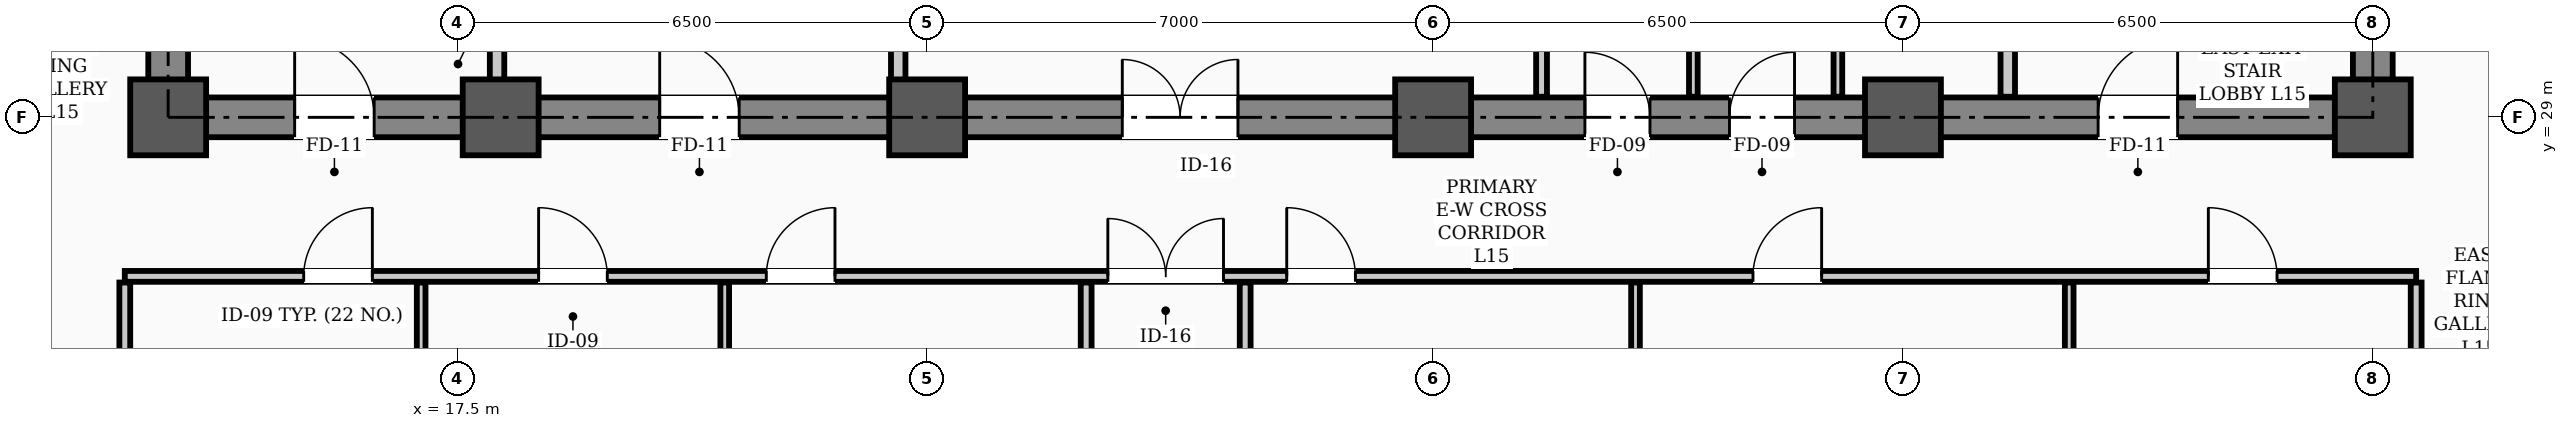
"""IFC4 building model, lengths in metres.
Left out: names, types, materials, properties, quantities, classifications, styles, units other than length and angle.
Written with IfcOpenShell. Run it as: python <this file> out.ifc"""

import sys

from ifc_helpers import new_model, si_unit, direction, frame, frame_2d, origin, origin_2d, place, context, subcontext, project, spatial, rectangle, hollow_rectangle, extrude, element, fill, save


model = new_model("IFC4")
c1 = context("Model", 3, precision=1e-05, world=origin(), true_north=direction((0.0, 1.0)))
c2 = subcontext(c1, "Body", "Model", "MODEL_VIEW")
j1 = project(units=[si_unit("LENGTHUNIT", "METRE"), si_unit("PLANEANGLEUNIT", "RADIAN")], contexts=[c1])
p1 = place(None, origin())
s1 = spatial("IfcSite", under=j1, at=p1, CompositionType="ELEMENT")
p2 = place(p1, origin())
s2 = spatial("IfcBuilding", under=s1, at=p2, CompositionType="ELEMENT")
p3 = place(p2, frame((0.0, 0.0, 61.6)))
s3 = spatial("IfcBuildingStorey", under=s2, at=p3, CompositionType="ELEMENT", Elevation=61.6)
for number, where, z_axis, x_axis in (
    (1, (13.5, 29.0, 0.0), (0.0, 0.0, 1.0), (1.0, 0.0, 0.0)),
    (2, (18.1, 29.0, 0.0), (0.0, 0.0, 1.0), (1.0, 0.0, 0.0)),
    (3, (24.0, 29.0, 0.0), (0.0, 0.0, 1.0), (1.0, 0.0, 0.0)),
    (4, (31.0, 29.0, 0.0), (0.0, 0.0, 1.0), (1.0, 0.0, 0.0)),
    (5, (37.5, 29.0, 0.0), (0.0, 0.0, 1.0), (1.0, 0.0, 0.0)),
    (6, (44.0, 29.0, 0.0), (0.0, 0.0, 1.0), (1.0, 0.0, 0.0)),
):
    element("IfcColumn", number, at=place(p3, frame(where, z_axis=z_axis, x_axis=x_axis)), inside=s3, PredefinedType="COLUMN", context=c2, shape_type="SweptSolid", body=[
        extrude(hollow_rectangle(XDim=1.05, YDim=1.05, WallThickness=0.038, InnerFilletRadius=0.019, OuterFilletRadius=0.057, at=origin_2d()), origin(), (0.0, 0.0, 1.0), 3.9),
    ])
p4 = place(p3, frame((13.5, 29.0, 0.0), z_axis=(0.0, 0.0, 1.0), x_axis=(1.0, 0.0, 0.0)))
e7 = element("IfcWall", 7, at=p4, inside=s3, PredefinedType="SHEAR", context=c2, shape_type="SweptSolid", body=[
    extrude(rectangle(XDim=30.5, YDim=0.55, at=frame_2d((15.25, 0.0))), origin(), (0.0, 0.0, 1.0), 3.72),
])
p5 = place(p4, frame((1.75, 0.0, 0.0)))
e8 = element("IfcOpeningElement", 8, at=p5, cuts=e7, PredefinedType="OPENING", context=c2, shape_type="SweptSolid", body=[
    extrude(rectangle(XDim=1.1, YDim=2.08, at=frame_2d((0.55, 1.04))), frame((0.0, 0.285, 0.0), z_axis=(0.0, -1.0, 0.0), x_axis=(1.0, 0.0, 0.0)), (0.0, 0.0, 1.0), 0.57),
])
p6 = place(p4, frame((26.7, 0.0, 0.0)))
e9 = element("IfcOpeningElement", 9, at=p6, cuts=e7, PredefinedType="OPENING", context=c2, shape_type="SweptSolid", body=[
    extrude(rectangle(XDim=1.1, YDim=2.08, at=frame_2d((0.55, 1.04))), frame((0.0, 0.285, 0.0), z_axis=(0.0, -1.0, 0.0), x_axis=(1.0, 0.0, 0.0)), (0.0, 0.0, 1.0), 0.57),
])
p7 = place(p4, frame((6.8, 0.0, 0.0)))
e10 = element("IfcOpeningElement", 10, at=p7, cuts=e7, PredefinedType="OPENING", context=c2, shape_type="SweptSolid", body=[
    extrude(rectangle(XDim=1.1, YDim=2.08, at=frame_2d((0.55, 1.04))), frame((0.0, 0.285, 0.0), z_axis=(0.0, -1.0, 0.0), x_axis=(1.0, 0.0, 0.0)), (0.0, 0.0, 1.0), 0.57),
])
p8 = place(p4, frame((13.2, 0.0, 0.0)))
e11 = element("IfcOpeningElement", 11, at=p8, cuts=e7, PredefinedType="OPENING", context=c2, shape_type="SweptSolid", body=[
    extrude(rectangle(XDim=1.6, YDim=2.08, at=frame_2d((0.8, 1.04))), frame((0.0, 0.285, 0.0), z_axis=(0.0, -1.0, 0.0), x_axis=(1.0, 0.0, 0.0)), (0.0, 0.0, 1.0), 0.57),
])
p9 = place(p4, frame((19.6, 0.0, 0.0)))
e12 = element("IfcOpeningElement", 12, at=p9, cuts=e7, PredefinedType="OPENING", context=c2, shape_type="SweptSolid", body=[
    extrude(rectangle(XDim=0.9, YDim=2.08, at=frame_2d((0.45, 1.04))), frame((0.0, 0.285, 0.0), z_axis=(0.0, -1.0, 0.0), x_axis=(1.0, 0.0, 0.0)), (0.0, 0.0, 1.0), 0.57),
])
p10 = place(p4, frame((21.6, 0.0, 0.0)))
e13 = element("IfcOpeningElement", 13, at=p10, cuts=e7, PredefinedType="OPENING", context=c2, shape_type="SweptSolid", body=[
    extrude(rectangle(XDim=0.9, YDim=2.08, at=frame_2d((0.45, 1.04))), frame((0.0, 0.285, 0.0), z_axis=(0.0, -1.0, 0.0), x_axis=(1.0, 0.0, 0.0)), (0.0, 0.0, 1.0), 0.57),
])
for number, where, z_axis, x_axis in (
    (14, (13.5, 29.35, 0.0), (0.0, 0.0, 1.0), (0.0, 1.0, 0.0)),
    (15, (44.0, 29.35, 0.0), (0.0, 0.0, 1.0), (0.0, 1.0, 0.0)),
):
    element("IfcWall", number, at=place(p3, frame(where, z_axis=z_axis, x_axis=x_axis)), inside=s3, PredefinedType="SHEAR", context=c2, shape_type="SweptSolid", body=[
        extrude(rectangle(XDim=8.6, YDim=0.55, at=frame_2d((4.3, 0.0))), origin(), (0.0, 0.0, 1.0), 3.72),
    ])
p11 = place(p3, frame((12.9, 26.8, 0.0), z_axis=(0.0, 0.0, 1.0), x_axis=(1.0, 0.0, 0.0)))
e16 = element("IfcWall", 16, at=p11, inside=s3, PredefinedType="PARTITIONING", context=c2, shape_type="SweptSolid", body=[
    extrude(rectangle(XDim=31.7, YDim=0.15, at=frame_2d((15.85, 0.0))), origin(), (0.0, 0.0, 1.0), 3.1),
])
p12 = place(p11, frame((13.6, 0.0, 0.0)))
e17 = element("IfcOpeningElement", 17, at=p12, cuts=e16, PredefinedType="OPENING", context=c2, shape_type="SweptSolid", body=[
    extrude(rectangle(XDim=1.6, YDim=2.08, at=frame_2d((0.8, 1.04))), frame((0.0, 0.085, 0.0), z_axis=(0.0, -1.0, 0.0), x_axis=(1.0, 0.0, 0.0)), (0.0, 0.0, 1.0), 0.17),
])
p13 = place(p11, frame((2.475, 0.0, 0.0)))
e18 = element("IfcOpeningElement", 18, at=p13, cuts=e16, PredefinedType="OPENING", context=c2, shape_type="SweptSolid", body=[
    extrude(rectangle(XDim=0.95, YDim=2.08, at=frame_2d((0.475, 1.04))), frame((0.0, 0.085, 0.0), z_axis=(0.0, -1.0, 0.0), x_axis=(1.0, 0.0, 0.0)), (0.0, 0.0, 1.0), 0.17),
])
p14 = place(p11, frame((5.725, 0.0, 0.0)))
e19 = element("IfcOpeningElement", 19, at=p14, cuts=e16, PredefinedType="OPENING", context=c2, shape_type="SweptSolid", body=[
    extrude(rectangle(XDim=0.95, YDim=2.08, at=frame_2d((0.475, 1.04))), frame((0.0, 0.085, 0.0), z_axis=(0.0, -1.0, 0.0), x_axis=(1.0, 0.0, 0.0)), (0.0, 0.0, 1.0), 0.17),
])
p15 = place(p11, frame((8.875, 0.0, 0.0)))
e20 = element("IfcOpeningElement", 20, at=p15, cuts=e16, PredefinedType="OPENING", context=c2, shape_type="SweptSolid", body=[
    extrude(rectangle(XDim=0.95, YDim=2.08, at=frame_2d((0.475, 1.04))), frame((0.0, 0.085, 0.0), z_axis=(0.0, -1.0, 0.0), x_axis=(1.0, 0.0, 0.0)), (0.0, 0.0, 1.0), 0.17),
])
p16 = place(p11, frame((16.075, 0.0, 0.0)))
e21 = element("IfcOpeningElement", 21, at=p16, cuts=e16, PredefinedType="OPENING", context=c2, shape_type="SweptSolid", body=[
    extrude(rectangle(XDim=0.95, YDim=2.08, at=frame_2d((0.475, 1.04))), frame((0.0, 0.085, 0.0), z_axis=(0.0, -1.0, 0.0), x_axis=(1.0, 0.0, 0.0)), (0.0, 0.0, 1.0), 0.17),
])
p17 = place(p11, frame((22.525, 0.0, 0.0)))
e22 = element("IfcOpeningElement", 22, at=p17, cuts=e16, PredefinedType="OPENING", context=c2, shape_type="SweptSolid", body=[
    extrude(rectangle(XDim=0.95, YDim=2.08, at=frame_2d((0.475, 1.04))), frame((0.0, 0.085, 0.0), z_axis=(0.0, -1.0, 0.0), x_axis=(1.0, 0.0, 0.0)), (0.0, 0.0, 1.0), 0.17),
])
p18 = place(p11, frame((28.825, 0.0, 0.0)))
e23 = element("IfcOpeningElement", 23, at=p18, cuts=e16, PredefinedType="OPENING", context=c2, shape_type="SweptSolid", body=[
    extrude(rectangle(XDim=0.95, YDim=2.08, at=frame_2d((0.475, 1.04))), frame((0.0, 0.085, 0.0), z_axis=(0.0, -1.0, 0.0), x_axis=(1.0, 0.0, 0.0)), (0.0, 0.0, 1.0), 0.17),
])
for number, where, z_axis, x_axis in (
    (24, (18.05, 29.285, 0.0), (0.0, 0.0, 1.0), (0.0, 1.0, 0.0)),
    (25, (38.95, 29.285, 0.0), (0.0, 0.0, 1.0), (0.0, 1.0, 0.0)),
):
    element("IfcWall", number, at=place(p3, frame(where, z_axis=z_axis, x_axis=x_axis)), inside=s3, PredefinedType="STANDARD", context=c2, shape_type="SweptSolid", body=[
        extrude(rectangle(XDim=1.015, YDim=0.2, at=frame_2d((0.508, 0.0))), origin(), (0.0, 0.0, 1.0), 3.3),
    ])
p19 = place(p3, frame((23.6, 29.285, 0.0), z_axis=(0.0, 0.0, 1.0), x_axis=(0.0, 1.0, 0.0)))
e26 = element("IfcWall", 26, at=p19, inside=s3, PredefinedType="STANDARD", context=c2, shape_type="SweptSolid", body=[
    extrude(rectangle(XDim=5.415, YDim=0.2, at=frame_2d((2.708, 0.0))), origin(), (0.0, 0.0, 1.0), 3.1),
])
p20 = place(p3, frame((32.5, 29.285, 0.0), z_axis=(0.0, 0.0, 1.0), x_axis=(0.0, 1.0, 0.0)))
e27 = element("IfcWall", 27, at=p20, inside=s3, PredefinedType="PARTITIONING", context=c2, shape_type="SweptSolid", body=[
    extrude(rectangle(XDim=2.48, YDim=0.15, at=frame_2d((1.24, 0.0))), origin(), (0.0, 0.0, 1.0), 3.3),
])
for number, where, z_axis, x_axis in (
    (28, (36.6, 29.285, 0.0), (0.0, 0.0, 1.0), (0.0, 1.0, 0.0)),
    (29, (34.6, 29.285, 0.0), (0.0, 0.0, 1.0), (0.0, 1.0, 0.0)),
):
    element("IfcWall", number, at=place(p3, frame(where, z_axis=z_axis, x_axis=x_axis)), inside=s3, PredefinedType="PARTITIONING", context=c2, shape_type="SweptSolid", body=[
        extrude(rectangle(XDim=2.48, YDim=0.12, at=frame_2d((1.24, 0.0))), origin(), (0.0, 0.0, 1.0), 3.3),
    ])
for number, where, z_axis, x_axis in (
    (30, (26.2, 19.335, 0.0), (0.0, 0.0, 1.0), (0.0, 1.0, 0.0)),
    (31, (28.4, 19.335, 0.0), (0.0, 0.0, 1.0), (0.0, 1.0, 0.0)),
    (32, (12.9, 19.335, 0.0), (0.0, 0.0, 1.0), (0.0, 1.0, 0.0)),
    (33, (44.6, 19.335, 0.0), (0.0, 0.0, 1.0), (0.0, 1.0, 0.0)),
):
    element("IfcWall", number, at=place(p3, frame(where, z_axis=z_axis, x_axis=x_axis)), inside=s3, PredefinedType="PARTITIONING", context=c2, shape_type="SweptSolid", body=[
        extrude(rectangle(XDim=7.38, YDim=0.15, at=frame_2d((3.69, 0.0))), origin(), (0.0, 0.0, 1.0), 3.0),
    ])
for number, where, z_axis, x_axis in (
    (34, (17.0, 19.335, 0.0), (0.0, 0.0, 1.0), (0.0, 1.0, 0.0)),
    (35, (21.2, 19.335, 0.0), (0.0, 0.0, 1.0), (0.0, 1.0, 0.0)),
    (36, (33.8, 19.335, 0.0), (0.0, 0.0, 1.0), (0.0, 1.0, 0.0)),
    (37, (39.8, 19.335, 0.0), (0.0, 0.0, 1.0), (0.0, 1.0, 0.0)),
):
    element("IfcWall", number, at=place(p3, frame(where, z_axis=z_axis, x_axis=x_axis)), inside=s3, PredefinedType="PARTITIONING", context=c2, shape_type="SweptSolid", body=[
        extrude(rectangle(XDim=7.38, YDim=0.12, at=frame_2d((3.69, 0.0))), origin(), (0.0, 0.0, 1.0), 3.0),
    ])
p21 = place(p5, origin())
e38 = element("IfcDoor", 38, at=p21, inside=s3, OperationType="SINGLE_SWING_LEFT", PredefinedType="DOOR", context=c2, shape_type="SweptSolid", body=[
    extrude(rectangle(XDim=1.1, YDim=2.08, at=frame_2d((0.55, 1.04))), frame((0.0, 0.025, 0.0), z_axis=(0.0, -1.0, 0.0), x_axis=(1.0, 0.0, 0.0)), (0.0, 0.0, 1.0), 0.05),
])
fill(e8, e38)
p22 = place(p6, origin())
e39 = element("IfcDoor", 39, at=p22, inside=s3, OperationType="SINGLE_SWING_RIGHT", PredefinedType="DOOR", context=c2, shape_type="SweptSolid", body=[
    extrude(rectangle(XDim=1.1, YDim=2.08, at=frame_2d((0.55, 1.04))), frame((0.0, 0.025, 0.0), z_axis=(0.0, -1.0, 0.0), x_axis=(1.0, 0.0, 0.0)), (0.0, 0.0, 1.0), 0.05),
])
fill(e9, e39)
p23 = place(p7, origin())
e40 = element("IfcDoor", 40, at=p23, inside=s3, OperationType="SINGLE_SWING_LEFT", PredefinedType="DOOR", context=c2, shape_type="SweptSolid", body=[
    extrude(rectangle(XDim=1.1, YDim=2.08, at=frame_2d((0.55, 1.04))), frame((0.0, 0.025, 0.0), z_axis=(0.0, -1.0, 0.0), x_axis=(1.0, 0.0, 0.0)), (0.0, 0.0, 1.0), 0.05),
])
fill(e10, e40)
p24 = place(p8, origin())
e41 = element("IfcDoor", 41, at=p24, inside=s3, OperationType="DOUBLE_DOOR_SINGLE_SWING", PredefinedType="DOOR", context=c2, shape_type="SweptSolid", body=[
    extrude(rectangle(XDim=1.6, YDim=2.08, at=frame_2d((0.8, 1.04))), frame((0.0, 0.025, 0.0), z_axis=(0.0, -1.0, 0.0), x_axis=(1.0, 0.0, 0.0)), (0.0, 0.0, 1.0), 0.05),
])
fill(e11, e41)
p25 = place(p9, origin())
e42 = element("IfcDoor", 42, at=p25, inside=s3, OperationType="SINGLE_SWING_LEFT", PredefinedType="DOOR", context=c2, shape_type="SweptSolid", body=[
    extrude(rectangle(XDim=0.9, YDim=2.08, at=frame_2d((0.45, 1.04))), frame((0.0, 0.025, 0.0), z_axis=(0.0, -1.0, 0.0), x_axis=(1.0, 0.0, 0.0)), (0.0, 0.0, 1.0), 0.05),
])
fill(e12, e42)
p26 = place(p10, origin())
e43 = element("IfcDoor", 43, at=p26, inside=s3, OperationType="SINGLE_SWING_RIGHT", PredefinedType="DOOR", context=c2, shape_type="SweptSolid", body=[
    extrude(rectangle(XDim=0.9, YDim=2.08, at=frame_2d((0.45, 1.04))), frame((0.0, 0.025, 0.0), z_axis=(0.0, -1.0, 0.0), x_axis=(1.0, 0.0, 0.0)), (0.0, 0.0, 1.0), 0.05),
])
fill(e13, e43)
p27 = place(p12, origin())
e44 = element("IfcDoor", 44, at=p27, inside=s3, OperationType="DOUBLE_DOOR_SINGLE_SWING", PredefinedType="DOOR", context=c2, shape_type="SweptSolid", body=[
    extrude(rectangle(XDim=1.6, YDim=2.08, at=frame_2d((0.8, 1.04))), frame((0.0, 0.025, 0.0), z_axis=(0.0, -1.0, 0.0), x_axis=(1.0, 0.0, 0.0)), (0.0, 0.0, 1.0), 0.05),
])
fill(e17, e44)
p28 = place(p13, origin())
e45 = element("IfcDoor", 45, at=p28, inside=s3, OperationType="SINGLE_SWING_RIGHT", PredefinedType="DOOR", context=c2, shape_type="SweptSolid", body=[
    extrude(rectangle(XDim=0.95, YDim=2.08, at=frame_2d((0.475, 1.04))), frame((0.0, 0.025, 0.0), z_axis=(0.0, -1.0, 0.0), x_axis=(1.0, 0.0, 0.0)), (0.0, 0.0, 1.0), 0.05),
])
fill(e18, e45)
p29 = place(p14, origin())
e46 = element("IfcDoor", 46, at=p29, inside=s3, OperationType="SINGLE_SWING_LEFT", PredefinedType="DOOR", context=c2, shape_type="SweptSolid", body=[
    extrude(rectangle(XDim=0.95, YDim=2.08, at=frame_2d((0.475, 1.04))), frame((0.0, 0.025, 0.0), z_axis=(0.0, -1.0, 0.0), x_axis=(1.0, 0.0, 0.0)), (0.0, 0.0, 1.0), 0.05),
])
fill(e19, e46)
p30 = place(p15, origin())
e47 = element("IfcDoor", 47, at=p30, inside=s3, OperationType="SINGLE_SWING_RIGHT", PredefinedType="DOOR", context=c2, shape_type="SweptSolid", body=[
    extrude(rectangle(XDim=0.95, YDim=2.08, at=frame_2d((0.475, 1.04))), frame((0.0, 0.025, 0.0), z_axis=(0.0, -1.0, 0.0), x_axis=(1.0, 0.0, 0.0)), (0.0, 0.0, 1.0), 0.05),
])
fill(e20, e47)
p31 = place(p16, origin())
e48 = element("IfcDoor", 48, at=p31, inside=s3, OperationType="SINGLE_SWING_LEFT", PredefinedType="DOOR", context=c2, shape_type="SweptSolid", body=[
    extrude(rectangle(XDim=0.95, YDim=2.08, at=frame_2d((0.475, 1.04))), frame((0.0, 0.025, 0.0), z_axis=(0.0, -1.0, 0.0), x_axis=(1.0, 0.0, 0.0)), (0.0, 0.0, 1.0), 0.05),
])
fill(e21, e48)
p32 = place(p17, origin())
e49 = element("IfcDoor", 49, at=p32, inside=s3, OperationType="SINGLE_SWING_RIGHT", PredefinedType="DOOR", context=c2, shape_type="SweptSolid", body=[
    extrude(rectangle(XDim=0.95, YDim=2.08, at=frame_2d((0.475, 1.04))), frame((0.0, 0.025, 0.0), z_axis=(0.0, -1.0, 0.0), x_axis=(1.0, 0.0, 0.0)), (0.0, 0.0, 1.0), 0.05),
])
fill(e22, e49)
p33 = place(p18, origin())
e50 = element("IfcDoor", 50, at=p33, inside=s3, OperationType="SINGLE_SWING_LEFT", PredefinedType="DOOR", context=c2, shape_type="SweptSolid", body=[
    extrude(rectangle(XDim=0.95, YDim=2.08, at=frame_2d((0.475, 1.04))), frame((0.0, 0.025, 0.0), z_axis=(0.0, -1.0, 0.0), x_axis=(1.0, 0.0, 0.0)), (0.0, 0.0, 1.0), 0.05),
])
fill(e23, e50)
save(model, sys.argv[1])
